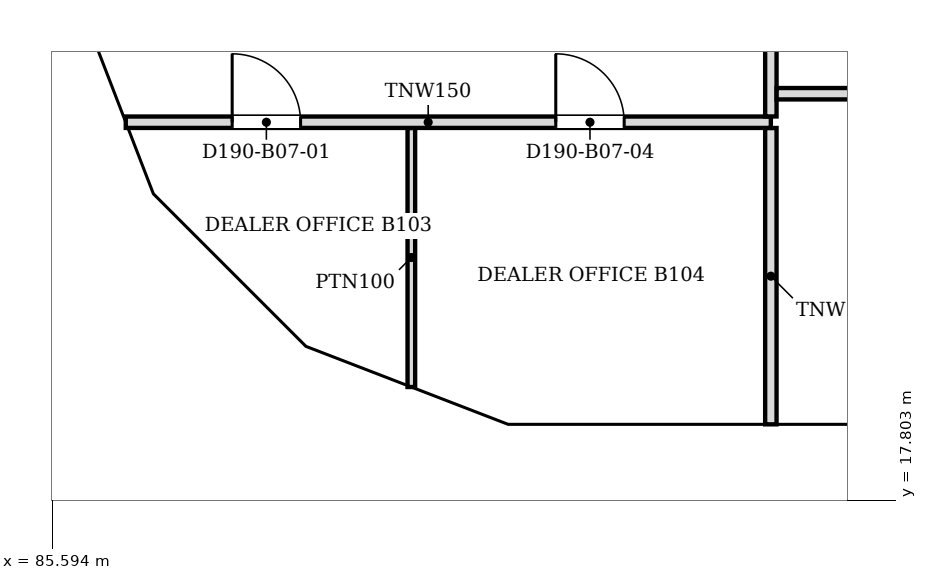
"""IFC4 building model, lengths in metres.
Left out: names, types, materials, properties, quantities, classifications, styles, units other than length and angle.
Written with IfcOpenShell. Run it as: python <this file> out.ifc"""

import sys

from ifc_helpers import new_model, si_unit, direction, frame, frame_2d, origin, place, context, subcontext, project, spatial, polyline, rectangle, outline, extrude, faceted_brep, source, transform, mapped, element, fill, save


model = new_model("IFC4")
c1 = context("Model", 3, precision=1e-05, world=origin(), true_north=direction((0.0, 1.0)))
c2 = subcontext(c1, "Body", "Model", "MODEL_VIEW")
j1 = project(units=[si_unit("LENGTHUNIT", "METRE"), si_unit("PLANEANGLEUNIT", "RADIAN")], contexts=[c1])
p1 = place(None, origin())
s1 = spatial("IfcSite", under=j1, at=p1, CompositionType="ELEMENT")
p2 = place(p1, origin())
s2 = spatial("IfcBuilding", under=s1, at=p2, CompositionType="ELEMENT")
p3 = place(p2, frame((0.0, 0.0, 68.6)))
s3 = spatial("IfcBuildingStorey", under=s2, at=p3, CompositionType="ELEMENT", Elevation=68.6)
m1 = source(origin(), c2, "Body", "Brep", [
    faceted_brep([(3.05, -0.25, 0.0), (0.047, -0.25, 3.8), (0.0, -0.25, 3.74), (0.0, -0.25, 0.0), (0.093, 0.25, 3.741), (3.05, 0.25, 0.0), (0.093, 0.25, 0.0), (0.047, 0.0, 3.8)], [[[0, 1, 2, 3]], [[4, 5, 6]], [[5, 4, 7, 1, 0]], [[2, 1, 7]], [[6, 5, 0, 3]], [[6, 3, 2, 7, 4]]]),
])
p4 = place(p3, frame((91.5, 18.55, 0.0), z_axis=(0.0, 0.0, 1.0), x_axis=(1.0, 0.0, 0.0)))
e1 = element("IfcWall", 1, at=p4, inside=s3, PredefinedType="SOLIDWALL", context=c2, shape_type="MappedRepresentation", body=[
    mapped(m1, transform((0.0, 0.0, 0.0), scale=1.0)),
])
m2 = source(origin(), c2, "Body", "SweptSolid", [
    extrude(outline(polyline([(2.534, 0.25), (0.247, 3.144), (0.247, 0.25), (2.534, 0.25)])), frame((0.0, 0.26, 0.0), z_axis=(0.0, -1.0, 0.0), x_axis=(1.0, 0.0, 0.0)), (0.0, 0.0, 1.0), 0.52),
])
p5 = place(p4, origin())
e2 = element("IfcOpeningElement", 2, at=p5, cuts=e1, PredefinedType="OPENING", context=c2, shape_type="MappedRepresentation", body=[
    mapped(m2, transform((0.0, 0.0, 0.0), scale=1.0)),
])
m3 = source(origin(), c2, "Body", "Brep", [
    faceted_brep([(2.997, -0.25, 3.741), (2.95, -0.25, 3.8), (0.0, -0.25, 0.0), (2.997, -0.25, 0.0), (0.053, 0.25, 0.068), (2.904, 0.25, 3.74), (2.904, 0.25, 0.0), (0.053, 0.25, 0.0), (2.95, 0.0, 3.8), (0.0, 0.0, 0.0)], [[[0, 1, 2, 3]], [[4, 5, 6, 7]], [[8, 1, 0]], [[5, 4, 9, 2, 1, 8]], [[7, 6, 3, 2, 9]], [[7, 9, 4]], [[3, 6, 5, 8, 0]]]),
])
p6 = place(p3, frame((88.794, 19.612, 0.0), z_axis=(0.0, 0.0, 1.0), x_axis=(0.933000876937, -0.359874094142, 0.0)))
e3 = element("IfcWall", 3, at=p6, inside=s3, PredefinedType="SOLIDWALL", context=c2, shape_type="MappedRepresentation", body=[
    mapped(m3, transform((0.0, 0.0, 0.0), scale=1.0)),
])
m4 = source(origin(), c2, "Body", "SweptSolid", [
    extrude(outline(polyline([(2.75, 3.135), (0.511, 0.25), (2.75, 0.25), (2.75, 3.135)])), frame((0.0, 0.26, 0.0), z_axis=(0.0, -1.0, 0.0), x_axis=(1.0, 0.0, 0.0)), (0.0, 0.0, 1.0), 0.52),
])
p7 = place(p6, origin())
e4 = element("IfcOpeningElement", 4, at=p7, cuts=e3, PredefinedType="OPENING", context=c2, shape_type="MappedRepresentation", body=[
    mapped(m4, transform((0.0, 0.0, 0.0), scale=1.0)),
])
m5 = source(origin(), c2, "Body", "Brep", [
    faceted_brep([(6.1, -0.25, 0.0), (3.05, -0.25, 3.8), (0.0, -0.25, 0.0), (6.1, -0.25, 0.0), (0.0, 0.25, 0.0), (3.05, 0.25, 3.8), (6.1, 0.25, 0.0), (6.1, 0.25, 0.0)], [[[0, 1, 2, 3]], [[4, 5, 6, 7]], [[6, 5, 1, 0]], [[5, 4, 2, 1]], [[4, 7, 3, 2]], [[3, 7, 6, 0]]]),
])
p8 = place(p3, frame((94.55, 18.55, 0.0), z_axis=(0.0, 0.0, 1.0), x_axis=(1.0, 0.0, 0.0)))
e5 = element("IfcWall", 5, at=p8, inside=s3, PredefinedType="SOLIDWALL", context=c2, shape_type="MappedRepresentation", body=[
    mapped(m5, transform((0.0, 0.0, 0.0), scale=1.0)),
])
m6 = source(origin(), c2, "Body", "SweptSolid", [
    extrude(outline(polyline([(5.579, 0.25), (3.05, 3.4), (0.521, 0.25), (5.579, 0.25)])), frame((0.0, 0.26, 0.0), z_axis=(0.0, -1.0, 0.0), x_axis=(1.0, 0.0, 0.0)), (0.0, 0.0, 1.0), 0.52),
])
p9 = place(p8, origin())
e6 = element("IfcOpeningElement", 6, at=p9, cuts=e5, PredefinedType="OPENING", context=c2, shape_type="MappedRepresentation", body=[
    mapped(m6, transform((0.0, 0.0, 0.0), scale=1.0)),
])
m7 = source(origin(), c2, "Body", "Brep", [
    faceted_brep([(3.003, -0.25, 3.731), (2.95, -0.25, 3.8), (0.0, -0.25, 0.0), (3.003, -0.25, 0.0), (0.047, 0.25, 0.06), (2.898, 0.25, 3.732), (2.898, 0.25, 0.0), (0.047, 0.25, 0.0), (2.95, 0.0, 3.8), (0.0, 0.0, 0.0)], [[[0, 1, 2, 3]], [[4, 5, 6, 7]], [[8, 1, 0]], [[5, 4, 9, 2, 1, 8]], [[7, 6, 3, 2, 9]], [[7, 9, 4]], [[3, 6, 5, 8, 0]]]),
])
p10 = place(p3, frame((85.65, 24.447, 0.0), z_axis=(0.0, 0.0, 1.0), x_axis=(0.35992665181, -0.932980602862, 0.0)))
e7 = element("IfcWall", 7, at=p10, inside=s3, PredefinedType="SOLIDWALL", context=c2, shape_type="MappedRepresentation", body=[
    mapped(m7, transform((0.0, 0.0, 0.0), scale=1.0)),
])
p11 = place(p10, origin())
e8 = element("IfcOpeningElement", 8, at=p11, cuts=e7, PredefinedType="OPENING", context=c2, shape_type="MappedRepresentation", body=[
    mapped(m4, transform((0.0, 0.0, 0.0), scale=1.0)),
])
m8 = source(origin(), c2, "Body", "Brep", [
    faceted_brep([(2.997, -0.25, 0.0), (0.053, -0.25, 3.8), (0.0, -0.25, 3.732), (0.0, -0.25, 0.0), (0.106, 0.25, 3.731), (2.944, 0.25, 0.068), (2.944, 0.25, 0.0), (0.106, 0.25, 0.0), (0.053, 0.0, 3.8), (2.997, 0.0, 0.0)], [[[0, 1, 2, 3]], [[4, 5, 6, 7]], [[5, 4, 8, 1, 0, 9]], [[2, 1, 8]], [[7, 6, 9, 0, 3]], [[7, 3, 2, 8, 4]], [[9, 6, 5]]]),
])
p12 = place(p3, frame((86.675, 21.731, 0.0), z_axis=(0.0, 0.0, 1.0), x_axis=(0.707106781187, -0.707106781187, 0.0)))
e9 = element("IfcWall", 9, at=p12, inside=s3, PredefinedType="SOLIDWALL", context=c2, shape_type="MappedRepresentation", body=[
    mapped(m8, transform((0.0, 0.0, 0.0), scale=1.0)),
])
m9 = source(origin(), c2, "Body", "SweptSolid", [
    extrude(outline(polyline([(2.487, 0.25), (0.253, 3.134), (0.253, 0.25), (2.487, 0.25)])), frame((0.0, 0.26, 0.0), z_axis=(0.0, -1.0, 0.0), x_axis=(1.0, 0.0, 0.0)), (0.0, 0.0, 1.0), 0.52),
])
p13 = place(p12, origin())
e10 = element("IfcOpeningElement", 10, at=p13, cuts=e9, PredefinedType="OPENING", context=c2, shape_type="MappedRepresentation", body=[
    mapped(m9, transform((0.0, 0.0, 0.0), scale=1.0)),
])
p14 = place(p2, frame((0.0, 0.0, 72.4)))
s4 = spatial("IfcBuildingStorey", under=s2, at=p14, CompositionType="ELEMENT", Elevation=72.4)
m10 = source(origin(), c2, "Body", "Brep", [
    faceted_brep([(3.003, -0.25, 0.0), (6.053, -0.25, 3.8), (3.003, -0.25, 7.6), (0.0, -0.25, 3.8), (0.047, 0.25, 3.859), (3.003, 0.25, 7.6), (6.053, 0.25, 3.8), (3.003, 0.25, 0.0), (0.047, 0.25, 3.741), (0.0, 0.0, 3.8)], [[[0, 1, 2, 3]], [[4, 5, 6, 7, 8]], [[7, 6, 1, 0]], [[6, 5, 2, 1]], [[5, 4, 9, 3, 2]], [[8, 7, 0, 3, 9]], [[8, 9, 4]]]),
])
p15 = place(p14, frame((91.547, 18.55, -3.8), z_axis=(0.0, 0.0, 1.0), x_axis=(1.0, 0.0, 0.0)))
e11 = element("IfcWall", 11, at=p15, inside=s4, PredefinedType="SOLIDWALL", context=c2, shape_type="MappedRepresentation", body=[
    mapped(m10, transform((0.0, 0.0, 0.0), scale=1.0)),
])
m11 = source(origin(), c2, "Body", "SweptSolid", [
    extrude(outline(polyline([(3.005, 0.401), (5.733, 3.8), (3.005, 7.199), (0.319, 3.8), (3.005, 0.401)])), frame((0.0, 0.26, 0.0), z_axis=(0.0, -1.0, 0.0), x_axis=(1.0, 0.0, 0.0)), (0.0, 0.0, 1.0), 0.52),
])
p16 = place(p15, origin())
e12 = element("IfcOpeningElement", 12, at=p16, cuts=e11, PredefinedType="OPENING", context=c2, shape_type="MappedRepresentation", body=[
    mapped(m11, transform((0.0, 0.0, 0.0), scale=1.0)),
])
m12 = source(origin(), c2, "Body", "Brep", [
    faceted_brep([(0.047, -0.25, 0.0), (2.997, -0.25, 3.8), (0.047, -0.25, 7.6), (0.0, -0.25, 7.541), (0.0, -0.25, 0.059), (0.093, 0.25, 7.54), (2.944, 0.25, 3.868), (2.944, 0.25, 3.732), (0.093, 0.25, 0.06), (2.997, 0.0, 3.8), (0.047, 0.0, 0.0), (0.047, 0.0, 7.6)], [[[0, 1, 2, 3, 4]], [[5, 6, 7, 8]], [[8, 7, 9, 1, 0, 10]], [[6, 5, 11, 2, 1, 9]], [[3, 2, 11]], [[10, 0, 4]], [[8, 10, 4, 3, 11, 5]], [[9, 7, 6]]]),
])
p17 = place(p14, frame((85.633, 24.49, -3.8), z_axis=(0.0, 0.0, 1.0), x_axis=(0.359901446078, -0.932990326376, 0.0)))
e13 = element("IfcWall", 13, at=p17, inside=s4, PredefinedType="SOLIDWALL", context=c2, shape_type="MappedRepresentation", body=[
    mapped(m12, transform((0.0, 0.0, 0.0), scale=1.0)),
])
m13 = source(origin(), c2, "Body", "SweptSolid", [
    extrude(outline(polyline([(0.247, 0.665), (2.681, 3.8), (0.247, 6.935), (0.247, 0.665)])), frame((0.0, 0.26, 0.0), z_axis=(0.0, -1.0, 0.0), x_axis=(1.0, 0.0, 0.0)), (0.0, 0.0, 1.0), 0.52),
])
p18 = place(p17, origin())
e14 = element("IfcOpeningElement", 14, at=p18, cuts=e13, PredefinedType="OPENING", context=c2, shape_type="MappedRepresentation", body=[
    mapped(m13, transform((0.0, 0.0, 0.0), scale=1.0)),
])
m14 = source(origin(), c2, "Body", "Brep", [
    faceted_brep([(2.944, -0.25, 0.0), (2.997, -0.25, 0.068), (2.997, -0.25, 7.532), (2.944, -0.25, 7.6), (0.0, -0.25, 3.8), (0.053, 0.25, 3.868), (2.891, 0.25, 7.532), (2.891, 0.25, 0.068), (0.053, 0.25, 3.731), (2.944, 0.0, 0.0), (2.944, 0.0, 7.6), (0.0, 0.0, 3.8)], [[[0, 1, 2, 3, 4]], [[5, 6, 7, 8]], [[1, 0, 9]], [[10, 3, 2]], [[6, 5, 11, 4, 3, 10]], [[8, 7, 9, 0, 4, 11]], [[8, 11, 5]], [[1, 9, 7, 6, 10, 2]]]),
])
p19 = place(p14, frame((86.712, 21.694, -3.8), z_axis=(0.0, 0.0, 1.0), x_axis=(0.707066050402, -0.707147509625, 0.0)))
e15 = element("IfcWall", 15, at=p19, inside=s4, PredefinedType="SOLIDWALL", context=c2, shape_type="MappedRepresentation", body=[
    mapped(m14, transform((0.0, 0.0, 0.0), scale=1.0)),
])
m15 = source(origin(), c2, "Body", "SweptSolid", [
    extrude(outline(polyline([(2.744, 6.934), (0.316, 3.8), (2.744, 0.666), (2.744, 6.934)])), frame((0.0, 0.26, 0.0), z_axis=(0.0, -1.0, 0.0), x_axis=(1.0, 0.0, 0.0)), (0.0, 0.0, 1.0), 0.52),
])
p20 = place(p19, origin())
e16 = element("IfcOpeningElement", 16, at=p20, cuts=e15, PredefinedType="OPENING", context=c2, shape_type="MappedRepresentation", body=[
    mapped(m15, transform((0.0, 0.0, 0.0), scale=1.0)),
])
m16 = source(origin(), c2, "Body", "Brep", [
    faceted_brep([(0.053, -0.25, 0.0), (3.003, -0.25, 3.8), (0.053, -0.25, 7.6), (0.0, -0.25, 7.531), (0.0, -0.25, 0.068), (0.106, 0.25, 7.532), (2.957, 0.25, 3.86), (2.957, 0.25, 3.74), (0.106, 0.25, 0.068), (3.003, 0.0, 3.8), (0.053, 0.0, 0.0), (0.053, 0.0, 7.6)], [[[0, 1, 2, 3, 4]], [[5, 6, 7, 8]], [[8, 7, 9, 1, 0, 10]], [[6, 5, 11, 2, 1, 9]], [[3, 2, 11]], [[10, 0, 4]], [[8, 10, 4, 3, 11, 5]], [[9, 7, 6]]]),
])
p21 = place(p14, frame((88.744, 19.631, -3.8), z_axis=(0.0, 0.0, 1.0), x_axis=(0.932997369089, -0.359883188373, 0.0)))
e17 = element("IfcWall", 17, at=p21, inside=s4, PredefinedType="SOLIDWALL", context=c2, shape_type="MappedRepresentation", body=[
    mapped(m16, transform((0.0, 0.0, 0.0), scale=1.0)),
])
m17 = source(origin(), c2, "Body", "SweptSolid", [
    extrude(outline(polyline([(0.253, 0.665), (2.687, 3.8), (0.253, 6.935), (0.253, 0.665)])), frame((0.0, 0.26, 0.0), z_axis=(0.0, -1.0, 0.0), x_axis=(1.0, 0.0, 0.0)), (0.0, 0.0, 1.0), 0.52),
])
p22 = place(p21, origin())
e18 = element("IfcOpeningElement", 18, at=p22, cuts=e17, PredefinedType="OPENING", context=c2, shape_type="MappedRepresentation", body=[
    mapped(m17, transform((0.0, 0.0, 0.0), scale=1.0)),
])
p23 = place(p3, frame((95.05, 18.8, 0.0), z_axis=(0.0, 0.0, 1.0), x_axis=(0.0, 1.0, 0.0)))
e19 = element("IfcWall", 19, at=p23, inside=s3, PredefinedType="PARTITIONING", context=c2, shape_type="SweptSolid", body=[
    extrude(rectangle(XDim=3.899, YDim=0.15, at=frame_2d((1.949, 0.0))), origin(), (0.0, 0.0, 1.0), 3.067),
])
p24 = place(p3, frame((90.32, 19.291, 0.0), z_axis=(0.0, 0.0, 1.0), x_axis=(0.0, 1.0, 0.0)))
e20 = element("IfcWall", 20, at=p24, inside=s3, PredefinedType="PARTITIONING", context=c2, shape_type="SweptSolid", body=[
    extrude(rectangle(XDim=3.408, YDim=0.1, at=frame_2d((1.704, 0.0))), origin(), (0.0, 0.0, 1.0), 3.067),
])
p25 = place(p3, frame((95.05, 22.775, 0.0), z_axis=(0.0, 0.0, 1.0), x_axis=(-1.0, 0.0, 0.0)))
e21 = element("IfcWall", 21, at=p25, inside=s3, PredefinedType="PARTITIONING", context=c2, shape_type="SweptSolid", body=[
    extrude(rectangle(XDim=8.487, YDim=0.15, at=frame_2d((4.244, 0.0))), origin(), (0.0, 0.0, 1.0), 3.067),
])
m18 = source(origin(), c2, "Body", "SweptSolid", [
    extrude(rectangle(XDim=0.9, YDim=2.1, at=frame_2d((0.45, 1.05))), frame((0.0, 0.085, 0.0), z_axis=(0.0, -1.0, 0.0), x_axis=(1.0, 0.0, 0.0)), (0.0, 0.0, 1.0), 0.17),
])
p26 = place(p25, frame((6.187, 0.0, 0.0)))
e22 = element("IfcOpeningElement", 22, at=p26, cuts=e21, PredefinedType="OPENING", context=c2, shape_type="MappedRepresentation", body=[
    mapped(m18, transform((0.0, 0.0, 0.0), scale=1.0)),
])
p27 = place(p25, frame((1.93, 0.0, 0.0)))
e23 = element("IfcOpeningElement", 23, at=p27, cuts=e21, PredefinedType="OPENING", context=c2, shape_type="MappedRepresentation", body=[
    mapped(m18, transform((0.0, 0.0, 0.0), scale=1.0)),
])
p28 = place(p3, frame((95.05, 22.851, 0.0), z_axis=(0.0, 0.0, 1.0), x_axis=(0.0, 1.0, 0.0)))
e24 = element("IfcWall", 24, at=p28, inside=s3, PredefinedType="PARTITIONING", context=c2, shape_type="SweptSolid", body=[
    extrude(rectangle(XDim=10.873, YDim=0.15, at=frame_2d((5.437, 0.0))), origin(), (0.0, 0.0, 1.0), 3.067),
])
p29 = place(p3, frame((107.25, 23.15, 0.0), z_axis=(0.0, 0.0, 1.0), x_axis=(-1.0, 0.0, 0.0)))
e25 = element("IfcWall", 25, at=p29, inside=s3, PredefinedType="PARTITIONING", context=c2, shape_type="SweptSolid", body=[
    extrude(rectangle(XDim=12.124, YDim=0.15, at=frame_2d((6.062, 0.0))), origin(), (0.0, 0.0, 1.0), 3.067),
])
p30 = place(p29, frame((8.324, 0.0, 0.0)))
e26 = element("IfcOpeningElement", 26, at=p30, cuts=e25, PredefinedType="OPENING", context=c2, shape_type="MappedRepresentation", body=[
    mapped(m18, transform((0.0, 0.0, 0.0), scale=1.0)),
])
p31 = place(p29, frame((2.706, 0.0, 0.0)))
e27 = element("IfcOpeningElement", 27, at=p31, cuts=e25, PredefinedType="OPENING", context=c2, shape_type="MappedRepresentation", body=[
    mapped(m18, transform((0.0, 0.0, 0.0), scale=1.0)),
])
m19 = source(origin(), c2, "Body", "SweptSolid", [
    extrude(rectangle(XDim=0.9, YDim=2.1, at=frame_2d((0.45, 1.05))), frame((0.0, 0.025, 0.0), z_axis=(0.0, -1.0, 0.0), x_axis=(1.0, 0.0, 0.0)), (0.0, 0.0, 1.0), 0.05),
])
p32 = place(p26, origin())
e28 = element("IfcDoor", 28, at=p32, inside=s3, OperationType="SINGLE_SWING_RIGHT", PredefinedType="DOOR", context=c2, shape_type="MappedRepresentation", body=[
    mapped(m19, transform((0.0, 0.0, 0.0), scale=1.0)),
])
fill(e22, e28)
p33 = place(p27, origin())
e29 = element("IfcDoor", 29, at=p33, inside=s3, OperationType="SINGLE_SWING_RIGHT", PredefinedType="DOOR", context=c2, shape_type="MappedRepresentation", body=[
    mapped(m19, transform((0.0, 0.0, 0.0), scale=1.0)),
])
fill(e23, e29)
save(model, sys.argv[1])
